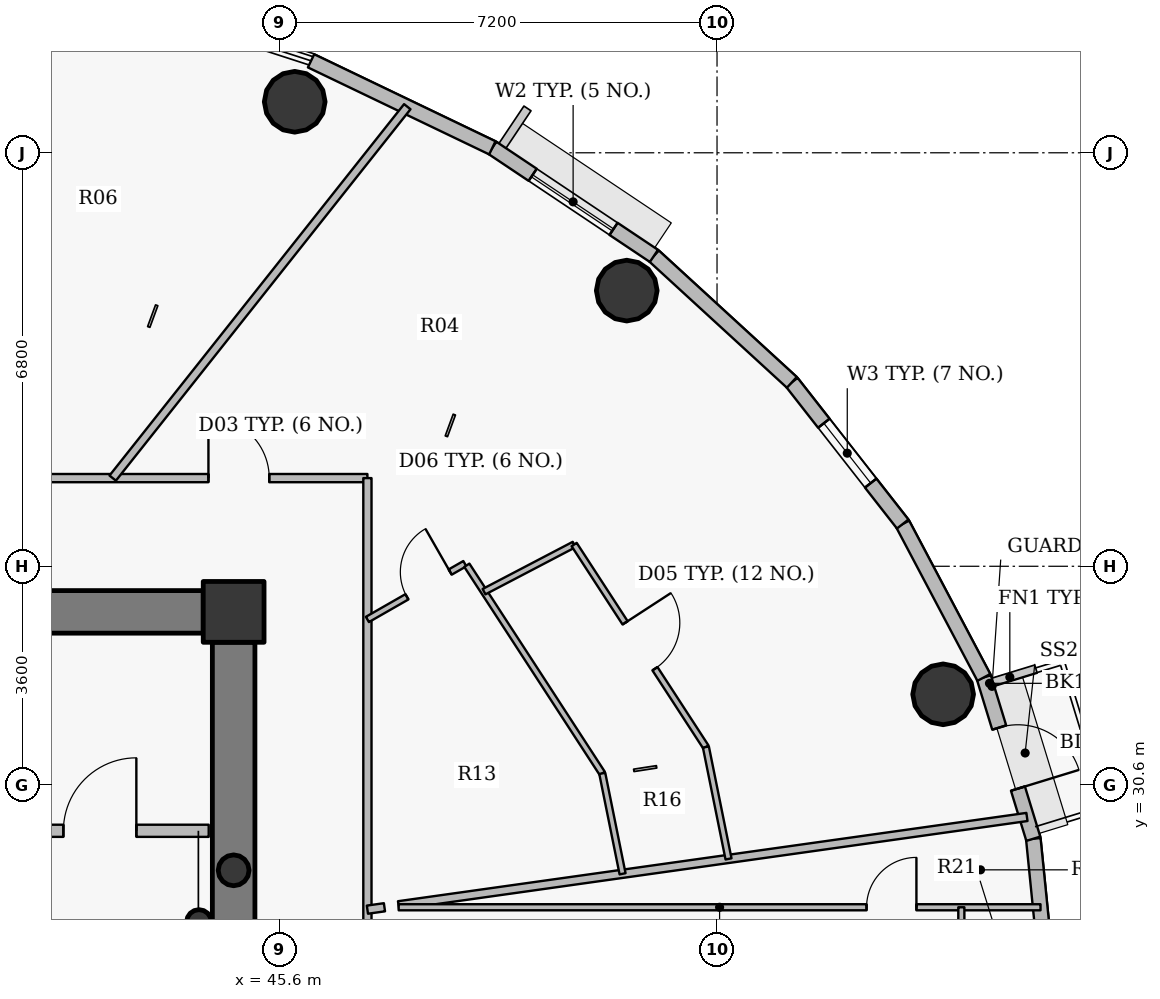
"""IFC4 building model, lengths in metres.
Left out: names, types, materials, properties, quantities, classifications, styles, units other than length and angle.
Written with IfcOpenShell. Run it as: python <this file> out.ifc"""

import sys

from ifc_helpers import new_model, si_unit, direction, frame, frame_2d, origin, origin_2d, place, context, subcontext, project, spatial, rectangle, hollow_circle, extrude, source, transform, mapped, element, fill, save


model = new_model("IFC4")
c1 = context("Model", 3, precision=1e-05, world=origin(), true_north=direction((0.0, 1.0)))
c2 = subcontext(c1, "Body", "Model", "MODEL_VIEW")
j1 = project(units=[si_unit("LENGTHUNIT", "METRE"), si_unit("PLANEANGLEUNIT", "RADIAN")], contexts=[c1])
p1 = place(None, origin())
s1 = spatial("IfcSite", under=j1, at=p1, CompositionType="ELEMENT")
p2 = place(p1, origin())
s2 = spatial("IfcBuilding", under=s1, at=p2, CompositionType="ELEMENT")
p3 = place(p2, frame((0.0, 0.0, 273.0)))
s3 = spatial("IfcBuildingStorey", under=s2, at=p3, CompositionType="ELEMENT", Elevation=273.0)
p4 = place(p3, frame((44.85, 33.45, 0.0), z_axis=(0.0, 0.0, 1.0), x_axis=(1.0, 0.0, 0.0)))
e1 = element("IfcColumn", 1, at=p4, inside=s3, PredefinedType="COLUMN", context=c2, shape_type="SweptSolid", body=[
    extrude(rectangle(XDim=1.0, YDim=1.0, at=origin_2d()), origin(), (0.0, 0.0, 1.0), 3.75),
])
p5 = place(p3, frame((44.28, 28.35, 0.0), z_axis=(0.0, 0.0, 1.0), x_axis=(1.0, 0.0, 0.0)))
e2 = element("IfcColumn", 2, at=p5, inside=s3, PredefinedType="COLUMN", context=c2, shape_type="SweptSolid", body=[
    extrude(hollow_circle(Radius=0.203, WallThickness=0.016, at=origin_2d()), origin(), (0.0, 0.0, 1.0), 3.75),
])
p6 = place(p3, frame((27.65, 33.45, 0.0), z_axis=(0.0, 0.0, 1.0), x_axis=(1.0, 0.0, 0.0)))
e3 = element("IfcWall", 3, at=p6, inside=s3, PredefinedType="SHEAR", context=c2, shape_type="SweptSolid", body=[
    extrude(rectangle(XDim=16.7, YDim=0.7, at=frame_2d((8.35, 0.0))), origin(), (0.0, 0.0, 1.0), 3.05),
])
p7 = place(p6, frame((12.775, 0.0, 0.0)))
e4 = element("IfcOpeningElement", 4, at=p7, cuts=e3, PredefinedType="OPENING", context=c2, shape_type="SweptSolid", body=[
    extrude(rectangle(XDim=1.15, YDim=2.15, at=origin_2d()), frame((0.575, 0.36, 1.075), z_axis=(0.0, -1.0, 0.0), x_axis=(1.0, 0.0, 0.0)), (0.0, 0.0, 1.0), 0.72),
])
p8 = place(p3, frame((44.85, 32.95, 0.0), z_axis=(0.0, 0.0, 1.0), x_axis=(0.0, -1.0, 0.0)))
e5 = element("IfcWall", 5, at=p8, inside=s3, PredefinedType="SHEAR", context=c2, shape_type="SweptSolid", body=[
    extrude(rectangle(XDim=11.9, YDim=0.7, at=frame_2d((5.95, 0.0))), origin(), (0.0, 0.0, 1.0), 3.05),
])
for number, where, z_axis, x_axis in (
    (6, (56.519, 32.094, 0.0), (0.0, 0.0, 1.0), (1.0, 0.0, 0.0)),
    (7, (51.315, 38.733, 0.0), (0.0, 0.0, 1.0), (1.0, 0.0, 0.0)),
    (8, (45.854, 41.839, 0.0), (0.0, 0.0, 1.0), (1.0, 0.0, 0.0)),
):
    element("IfcColumn", number, at=place(p3, frame(where, z_axis=z_axis, x_axis=x_axis)), inside=s3, PredefinedType="COLUMN", context=c2, shape_type="SweptSolid", body=[
        extrude(hollow_circle(Radius=0.5, WallThickness=0.032, at=origin_2d()), origin(), (0.0, 0.0, 1.0), 3.75),
    ])
p9 = place(p3, frame((44.85, 29.2, 0.0), z_axis=(0.0, 0.0, 1.0), x_axis=(1.0, 0.0, 0.0)))
e9 = element("IfcColumn", 9, at=p9, inside=s3, PredefinedType="COLUMN", context=c2, shape_type="SweptSolid", body=[
    extrude(hollow_circle(Radius=0.254, WallThickness=0.02, at=origin_2d()), origin(), (0.0, 0.0, 1.0), 3.75),
])
p10 = place(p3, frame((58.002, 29.719, 0.0), z_axis=(0.0, 0.0, 1.0), x_axis=(0.099972526841, -0.99499019788, 0.0)))
e10 = element("IfcWall", 10, at=p10, inside=s3, PredefinedType="SOLIDWALL", context=c2, shape_type="SweptSolid", body=[
    extrude(rectangle(XDim=2.733, YDim=0.24, at=frame_2d((1.366, 0.0))), origin(), (0.0, 0.0, 1.0), 3.5),
])
p11 = place(p3, frame((57.188, 32.372, 0.0), z_axis=(0.0, 0.0, 1.0), x_axis=(0.2931213403, -0.956075248012, 0.0)))
e11 = element("IfcWall", 11, at=p11, inside=s3, PredefinedType="SOLIDWALL", context=c2, shape_type="SweptSolid", body=[
    extrude(rectangle(XDim=2.775, YDim=0.24, at=frame_2d((1.388, 0.0))), origin(), (0.0, 0.0, 1.0), 3.5),
])
p12 = place(p11, frame((0.863, 0.0, 0.0)))
e12 = element("IfcOpeningElement", 12, at=p12, cuts=e11, PredefinedType="OPENING", context=c2, shape_type="SweptSolid", body=[
    extrude(rectangle(XDim=1.05, YDim=2.15, at=origin_2d()), frame((0.525, 0.13, 1.075), z_axis=(0.0, -1.0, 0.0), x_axis=(1.0, 0.0, 0.0)), (0.0, 0.0, 1.0), 0.26),
])
p13 = place(p3, frame((55.854, 34.895, 0.0), z_axis=(0.0, 0.0, 1.0), x_axis=(0.467628269026, -0.883925224218, 0.0)))
e13 = element("IfcWall", 13, at=p13, inside=s3, PredefinedType="SOLIDWALL", context=c2, shape_type="SweptSolid", body=[
    extrude(rectangle(XDim=2.854, YDim=0.24, at=frame_2d((1.427, 0.0))), origin(), (0.0, 0.0, 1.0), 3.5),
])
p14 = place(p3, frame((54.03, 37.225, 0.0), z_axis=(0.0, 0.0, 1.0), x_axis=(0.616337186556, -0.787482363275, 0.0)))
e14 = element("IfcWall", 14, at=p14, inside=s3, PredefinedType="SOLIDWALL", context=c2, shape_type="SweptSolid", body=[
    extrude(rectangle(XDim=2.958, YDim=0.24, at=frame_2d((1.479, 0.0))), origin(), (0.0, 0.0, 1.0), 3.5),
])
p15 = place(p14, frame((0.854, 0.0, 0.9)))
e15 = element("IfcOpeningElement", 15, at=p15, cuts=e14, PredefinedType="OPENING", context=c2, shape_type="SweptSolid", body=[
    extrude(rectangle(XDim=1.25, YDim=1.65, at=origin_2d()), frame((0.625, 0.13, 0.825), z_axis=(0.0, -1.0, 0.0), x_axis=(1.0, 0.0, 0.0)), (0.0, 0.0, 1.0), 0.26),
])
p16 = place(p3, frame((51.762, 39.304, 0.0), z_axis=(0.0, 0.0, 1.0), x_axis=(0.737068506972, -0.675818034703, 0.0)))
e16 = element("IfcWall", 16, at=p16, inside=s3, PredefinedType="SOLIDWALL", context=c2, shape_type="SweptSolid", body=[
    extrude(rectangle(XDim=3.077, YDim=0.24, at=frame_2d((1.539, 0.0))), origin(), (0.0, 0.0, 1.0), 3.5),
])
p17 = place(p3, frame((49.104, 41.082, 0.0), z_axis=(0.0, 0.0, 1.0), x_axis=(0.831250592635, -0.55589787933, 0.0)))
e17 = element("IfcWall", 17, at=p17, inside=s3, PredefinedType="SOLIDWALL", context=c2, shape_type="SweptSolid", body=[
    extrude(rectangle(XDim=3.197, YDim=0.24, at=frame_2d((1.599, 0.0))), origin(), (0.0, 0.0, 1.0), 3.5),
])
p18 = place(p17, frame((0.798, 0.0, 0.9)))
e18 = element("IfcOpeningElement", 18, at=p18, cuts=e17, PredefinedType="OPENING", context=c2, shape_type="SweptSolid", body=[
    extrude(rectangle(XDim=1.6, YDim=1.75, at=origin_2d()), frame((0.8, 0.13, 0.875), z_axis=(0.0, -1.0, 0.0), x_axis=(1.0, 0.0, 0.0)), (0.0, 0.0, 1.0), 0.26),
])
p19 = place(p3, frame((46.123, 42.512, 0.0), z_axis=(0.0, 0.0, 1.0), x_axis=(0.901573741254, -0.43262546051, 0.0)))
e19 = element("IfcWall", 19, at=p19, inside=s3, PredefinedType="SOLIDWALL", context=c2, shape_type="SweptSolid", body=[
    extrude(rectangle(XDim=3.307, YDim=0.24, at=frame_2d((1.653, 0.0))), origin(), (0.0, 0.0, 1.0), 3.5),
])
p20 = place(p3, frame((35.95, 29.85, 0.0), z_axis=(0.0, 0.0, 1.0), x_axis=(1.0, 0.0, 0.0)))
e20 = element("IfcWall", 20, at=p20, inside=s3, PredefinedType="PARTITIONING", context=c2, shape_type="SweptSolid", body=[
    extrude(rectangle(XDim=8.49, YDim=0.2, at=frame_2d((4.245, 0.0))), origin(), (0.0, 0.0, 1.0), 3.085),
])
p21 = place(p20, frame((6.1, 0.0, 0.0)))
e21 = element("IfcOpeningElement", 21, at=p21, cuts=e20, PredefinedType="OPENING", context=c2, shape_type="SweptSolid", body=[
    extrude(rectangle(XDim=1.2, YDim=2.15, at=origin_2d()), frame((0.6, 0.11, 1.075), z_axis=(0.0, -1.0, 0.0), x_axis=(1.0, 0.0, 0.0)), (0.0, 0.0, 1.0), 0.22),
])
p22 = place(p20, frame((0.37, 0.0, 0.0)))
e22 = element("IfcOpeningElement", 22, at=p22, cuts=e20, PredefinedType="OPENING", context=c2, shape_type="SweptSolid", body=[
    extrude(rectangle(XDim=1.15, YDim=2.15, at=origin_2d()), frame((0.575, 0.11, 1.075), z_axis=(0.0, -1.0, 0.0), x_axis=(1.0, 0.0, 0.0)), (0.0, 0.0, 1.0), 0.22),
])
p23 = place(p20, frame((2.425, 0.0, 0.0)))
e23 = element("IfcOpeningElement", 23, at=p23, cuts=e20, PredefinedType="OPENING", context=c2, shape_type="SweptSolid", body=[
    extrude(rectangle(XDim=1.05, YDim=2.15, at=origin_2d()), frame((0.525, 0.11, 1.075), z_axis=(0.0, -1.0, 0.0), x_axis=(1.0, 0.0, 0.0)), (0.0, 0.0, 1.0), 0.22),
])
p24 = place(p3, frame((36.95, 35.65, 0.0), z_axis=(0.0, 0.0, 1.0), x_axis=(1.0, 0.0, 0.0)))
e24 = element("IfcWall", 24, at=p24, inside=s3, PredefinedType="PARTITIONING", context=c2, shape_type="SweptSolid", body=[
    extrude(rectangle(XDim=10.1, YDim=0.135, at=frame_2d((5.05, 0.0))), origin(), (0.0, 0.0, 1.0), 3.035),
])
p25 = place(p24, frame((7.486, 0.0, 0.0)))
e25 = element("IfcOpeningElement", 25, at=p25, cuts=e24, PredefinedType="OPENING", context=c2, shape_type="SweptSolid", body=[
    extrude(rectangle(XDim=1.0, YDim=2.15, at=origin_2d()), frame((0.5, 0.078, 1.075), z_axis=(0.0, -1.0, 0.0), x_axis=(1.0, 0.0, 0.0)), (0.0, 0.0, 1.0), 0.155),
])
p26 = place(p24, frame((3.272, 0.0, 0.0)))
e26 = element("IfcOpeningElement", 26, at=p26, cuts=e24, PredefinedType="OPENING", context=c2, shape_type="SweptSolid", body=[
    extrude(rectangle(XDim=1.0, YDim=2.15, at=origin_2d()), frame((0.5, 0.078, 1.075), z_axis=(0.0, -1.0, 0.0), x_axis=(1.0, 0.0, 0.0)), (0.0, 0.0, 1.0), 0.155),
])
p27 = place(p3, frame((42.861, 35.65, 0.0), z_axis=(0.0, 0.0, 1.0), x_axis=(0.621439784824, 0.783461928774, 0.0)))
e27 = element("IfcWall", 27, at=p27, inside=s3, PredefinedType="PARTITIONING", context=c2, shape_type="SweptSolid", body=[
    extrude(rectangle(XDim=7.796, YDim=0.135, at=frame_2d((3.898, 0.0))), origin(), (0.0, 0.0, 1.0), 2.985),
])
p28 = place(p3, frame((47.05, 18.503, 0.0), z_axis=(0.0, 0.0, 1.0), x_axis=(0.0, 1.0, 0.0)))
e28 = element("IfcWall", 28, at=p28, inside=s3, PredefinedType="PARTITIONING", context=c2, shape_type="SweptSolid", body=[
    extrude(rectangle(XDim=17.147, YDim=0.135, at=frame_2d((8.574, 0.0))), origin(), (0.0, 0.0, 1.0), 3.035),
])
p29 = place(p28, frame((4.545, 0.0, 0.0)))
e29 = element("IfcOpeningElement", 29, at=p29, cuts=e28, PredefinedType="OPENING", context=c2, shape_type="SweptSolid", body=[
    extrude(rectangle(XDim=1.0, YDim=2.15, at=origin_2d()), frame((0.5, 0.078, 1.075), z_axis=(0.0, -1.0, 0.0), x_axis=(1.0, 0.0, 0.0)), (0.0, 0.0, 1.0), 0.155),
])
p30 = place(p3, frame((47.05, 28.553, 0.0), z_axis=(0.0, 0.0, 1.0), x_axis=(0.990308552968, 0.138884736087, 0.0)))
e30 = element("IfcWall", 30, at=p30, inside=s3, PredefinedType="PARTITIONING", context=c2, shape_type="SweptSolid", body=[
    extrude(rectangle(XDim=0.283, YDim=0.135, at=frame_2d((0.142, 0.0))), origin(), (0.0, 0.0, 1.0), 3.5),
])
p31 = place(p3, frame((47.05, 33.326, 0.0), z_axis=(0.0, 0.0, 1.0), x_axis=(0.867827775188, 0.496865125172, 0.0)))
e31 = element("IfcWall", 31, at=p31, inside=s3, PredefinedType="PARTITIONING", context=c2, shape_type="SweptSolid", body=[
    extrude(rectangle(XDim=1.846, YDim=0.1, at=frame_2d((0.923, 0.0))), origin(), (0.0, 0.0, 1.0), 3.5),
])
p32 = place(p31, frame((0.749, 0.0, 0.0)))
e32 = element("IfcOpeningElement", 32, at=p32, cuts=e31, PredefinedType="OPENING", context=c2, shape_type="SweptSolid", body=[
    extrude(rectangle(XDim=0.82, YDim=2.1, at=origin_2d()), frame((0.41, 0.06, 1.05), z_axis=(0.0, -1.0, 0.0), x_axis=(1.0, 0.0, 0.0)), (0.0, 0.0, 1.0), 0.12),
])
p33 = place(p3, frame((47.562, 28.625, 0.0), z_axis=(0.0, 0.0, 1.0), x_axis=(0.990269276455, 0.139164507362, 0.0)))
e33 = element("IfcWall", 33, at=p33, inside=s3, PredefinedType="PARTITIONING", context=c2, shape_type="SweptSolid", body=[
    extrude(rectangle(XDim=10.437, YDim=0.135, at=frame_2d((5.218, 0.0))), origin(), (0.0, 0.0, 1.0), 2.985),
])
p34 = place(p3, frame((47.564, 28.592, 0.0), z_axis=(0.0, 0.0, 1.0), x_axis=(1.0, 0.0, 0.0)))
e34 = element("IfcWall", 34, at=p34, inside=s3, PredefinedType="PARTITIONING", context=c2, shape_type="SweptSolid", body=[
    extrude(rectangle(XDim=10.555, YDim=0.1, at=frame_2d((5.278, 0.0))), origin(), (0.0, 0.0, 1.0), 2.985),
])
p35 = place(p34, frame((7.695, 0.0, 0.0)))
e35 = element("IfcOpeningElement", 35, at=p35, cuts=e34, PredefinedType="OPENING", context=c2, shape_type="SweptSolid", body=[
    extrude(rectangle(XDim=0.82, YDim=2.1, at=origin_2d()), frame((0.41, 0.06, 1.05), z_axis=(0.0, -1.0, 0.0), x_axis=(1.0, 0.0, 0.0)), (0.0, 0.0, 1.0), 0.12),
])
p36 = place(p3, frame((48.685, 34.217, 0.0), z_axis=(0.0, 0.0, 1.0), x_axis=(0.54540855562, -0.8381703332, 0.0)))
e36 = element("IfcWall", 36, at=p36, inside=s3, PredefinedType="PARTITIONING", context=c2, shape_type="SweptSolid", body=[
    extrude(rectangle(XDim=4.084, YDim=0.1, at=frame_2d((2.042, 0.0))), origin(), (0.0, 0.0, 1.0), 3.035),
])
p37 = place(p3, frame((48.968, 33.782, 0.0), z_axis=(0.0, 0.0, 1.0), x_axis=(0.886102824681, 0.463488709779, 0.0)))
e37 = element("IfcWall", 37, at=p37, inside=s3, PredefinedType="PARTITIONING", context=c2, shape_type="SweptSolid", body=[
    extrude(rectangle(XDim=1.672, YDim=0.1, at=frame_2d((0.836, 0.0))), origin(), (0.0, 0.0, 1.0), 3.5),
])
p38 = place(p3, frame((50.45, 34.558, 0.0), z_axis=(0.0, 0.0, 1.0), x_axis=(0.545448348881, -0.838144437853, 0.0)))
e38 = element("IfcWall", 38, at=p38, inside=s3, PredefinedType="PARTITIONING", context=c2, shape_type="SweptSolid", body=[
    extrude(rectangle(XDim=3.973, YDim=0.1, at=frame_2d((1.986, 0.0))), origin(), (0.0, 0.0, 1.0), 3.035),
])
p39 = place(p38, frame((1.536, 0.0, 0.0)))
e39 = element("IfcOpeningElement", 39, at=p39, cuts=e38, PredefinedType="OPENING", context=c2, shape_type="SweptSolid", body=[
    extrude(rectangle(XDim=0.9, YDim=2.1, at=origin_2d()), frame((0.45, 0.06, 1.05), z_axis=(0.0, -1.0, 0.0), x_axis=(1.0, 0.0, 0.0)), (0.0, 0.0, 1.0), 0.12),
])
p40 = place(p3, frame((50.913, 30.794, 0.0), z_axis=(0.0, 0.0, 1.0), x_axis=(0.198233557602, -0.980154812588, 0.0)))
e40 = element("IfcWall", 40, at=p40, inside=s3, PredefinedType="PARTITIONING", context=c2, shape_type="SweptSolid", body=[
    extrude(rectangle(XDim=1.685, YDim=0.1, at=frame_2d((0.842, 0.0))), origin(), (0.0, 0.0, 1.0), 3.035),
])
p41 = place(p3, frame((52.617, 31.228, 0.0), z_axis=(0.0, 0.0, 1.0), x_axis=(0.198191443997, -0.980163329005, 0.0)))
e41 = element("IfcWall", 41, at=p41, inside=s3, PredefinedType="PARTITIONING", context=c2, shape_type="SweptSolid", body=[
    extrude(rectangle(XDim=1.877, YDim=0.1, at=frame_2d((0.939, 0.0))), origin(), (0.0, 0.0, 1.0), 3.035),
])
p42 = place(p3, frame((56.818, 20.917, 0.0), z_axis=(0.0, 0.0, 1.0), x_axis=(0.0, 1.0, 0.0)))
e42 = element("IfcWall", 42, at=p42, inside=s3, PredefinedType="PARTITIONING", context=c2, shape_type="SweptSolid", body=[
    extrude(rectangle(XDim=7.675, YDim=0.1, at=frame_2d((3.837, 0.0))), origin(), (0.0, 0.0, 1.0), 2.985),
])
p43 = place(p42, frame((3.388, 0.0, 0.0)))
e43 = element("IfcOpeningElement", 43, at=p43, cuts=e42, PredefinedType="OPENING", context=c2, shape_type="SweptSolid", body=[
    extrude(rectangle(XDim=0.9, YDim=2.1, at=origin_2d()), frame((0.45, 0.06, 1.05), z_axis=(0.0, -1.0, 0.0), x_axis=(1.0, 0.0, 0.0)), (0.0, 0.0, 1.0), 0.12),
])
p44 = place(p3, frame((45.2, 33.8, 0.0), z_axis=(0.0, 0.0, 1.0), x_axis=(-1.0, 0.0, 0.0)))
e44 = element("IfcWall", 44, at=p44, inside=s3, PredefinedType="PARTITIONING", context=c2, shape_type="SweptSolid", body=[
    extrude(rectangle(XDim=0.84, YDim=0.135, at=frame_2d((0.42, 0.0))), origin(), (0.0, 0.0, 1.0), 3.035),
])
p45 = place(p3, frame((45.2, 32.96, 0.0), z_axis=(0.0, 0.0, 1.0), x_axis=(0.0, 1.0, 0.0)))
e45 = element("IfcWall", 45, at=p45, inside=s3, PredefinedType="PARTITIONING", context=c2, shape_type="SweptSolid", body=[
    extrude(rectangle(XDim=0.532, YDim=0.135, at=frame_2d((0.266, 0.0))), origin(), (0.0, 0.0, 1.0), 3.185),
])
m1 = source(origin(), c2, "Body", "SweptSolid", [
    extrude(rectangle(XDim=1.05, YDim=2.15, at=origin_2d()), frame((0.525, 0.025, 1.075), z_axis=(0.0, -1.0, 0.0), x_axis=(1.0, 0.0, 0.0)), (0.0, 0.0, 1.0), 0.05),
])
p46 = place(p12, origin())
e46 = element("IfcDoor", 46, at=p46, inside=s3, OperationType="SINGLE_SWING_RIGHT", PredefinedType="DOOR", context=c2, shape_type="MappedRepresentation", body=[
    mapped(m1, transform((0.0, 0.0, 0.0), x_axis=(1.0, 0.0, 0.0), y_axis=(0.0, 1.0, 0.0), z_axis=(0.0, 0.0, 1.0), scale=1.0)),
])
fill(e12, e46)
m2 = source(origin(), c2, "Body", "SweptSolid", [
    extrude(rectangle(XDim=1.25, YDim=1.65, at=origin_2d()), frame((0.625, 0.03, 0.825), z_axis=(0.0, -1.0, 0.0), x_axis=(1.0, 0.0, 0.0)), (0.0, 0.0, 1.0), 0.06),
])
p47 = place(p15, origin())
e47 = element("IfcWindow", 47, at=p47, inside=s3, PartitioningType="SINGLE_PANEL", PredefinedType="WINDOW", context=c2, shape_type="MappedRepresentation", body=[
    mapped(m2, transform((0.0, 0.0, 0.0), x_axis=(1.0, 0.0, 0.0), y_axis=(0.0, 1.0, 0.0), z_axis=(0.0, 0.0, 1.0), scale=1.0)),
])
fill(e15, e47)
m3 = source(origin(), c2, "Body", "SweptSolid", [
    extrude(rectangle(XDim=1.6, YDim=1.75, at=origin_2d()), frame((0.8, 0.03, 0.875), z_axis=(0.0, -1.0, 0.0), x_axis=(1.0, 0.0, 0.0)), (0.0, 0.0, 1.0), 0.06),
])
p48 = place(p18, origin())
e48 = element("IfcWindow", 48, at=p48, inside=s3, PartitioningType="DOUBLE_PANEL_VERTICAL", PredefinedType="WINDOW", context=c2, shape_type="MappedRepresentation", body=[
    mapped(m3, transform((0.0, 0.0, 0.0), x_axis=(1.0, 0.0, 0.0), y_axis=(0.0, 1.0, 0.0), z_axis=(0.0, 0.0, 1.0), scale=1.0)),
])
fill(e18, e48)
m4 = source(origin(), c2, "Body", "SweptSolid", [
    extrude(rectangle(XDim=1.2, YDim=2.15, at=origin_2d()), frame((0.6, 0.025, 1.075), z_axis=(0.0, -1.0, 0.0), x_axis=(1.0, 0.0, 0.0)), (0.0, 0.0, 1.0), 0.05),
])
p49 = place(p21, origin())
e49 = element("IfcDoor", 49, at=p49, inside=s3, OperationType="SINGLE_SWING_RIGHT", PredefinedType="DOOR", context=c2, shape_type="MappedRepresentation", body=[
    mapped(m4, transform((0.0, 0.0, 0.0), x_axis=(1.0, 0.0, 0.0), y_axis=(0.0, 1.0, 0.0), z_axis=(0.0, 0.0, 1.0), scale=1.0)),
])
fill(e21, e49)
m5 = source(origin(), c2, "Body", "SweptSolid", [
    extrude(rectangle(XDim=1.0, YDim=2.15, at=origin_2d()), frame((0.5, 0.025, 1.075), z_axis=(0.0, -1.0, 0.0), x_axis=(1.0, 0.0, 0.0)), (0.0, 0.0, 1.0), 0.05),
])
p50 = place(p25, origin())
e50 = element("IfcDoor", 50, at=p50, inside=s3, OperationType="SINGLE_SWING_LEFT", PredefinedType="DOOR", context=c2, shape_type="MappedRepresentation", body=[
    mapped(m5, transform((0.0, 0.0, 0.0), x_axis=(1.0, 0.0, 0.0), y_axis=(0.0, 1.0, 0.0), z_axis=(0.0, 0.0, 1.0), scale=1.0)),
])
fill(e25, e50)
m6 = source(origin(), c2, "Body", "SweptSolid", [
    extrude(rectangle(XDim=0.82, YDim=2.1, at=origin_2d()), frame((0.41, 0.025, 1.05), z_axis=(0.0, -1.0, 0.0), x_axis=(1.0, 0.0, 0.0)), (0.0, 0.0, 1.0), 0.05),
])
p51 = place(p32, origin())
e51 = element("IfcDoor", 51, at=p51, inside=s3, OperationType="SINGLE_SWING_RIGHT", PredefinedType="DOOR", context=c2, shape_type="MappedRepresentation", body=[
    mapped(m6, transform((0.0, 0.0, 0.0), x_axis=(1.0, 0.0, 0.0), y_axis=(0.0, 1.0, 0.0), z_axis=(0.0, 0.0, 1.0), scale=1.0)),
])
fill(e32, e51)
m7 = source(origin(), c2, "Body", "SweptSolid", [
    extrude(rectangle(XDim=0.9, YDim=2.1, at=origin_2d()), frame((0.45, 0.025, 1.05), z_axis=(0.0, -1.0, 0.0), x_axis=(1.0, 0.0, 0.0)), (0.0, 0.0, 1.0), 0.05),
])
p52 = place(p39, origin())
e52 = element("IfcDoor", 52, at=p52, inside=s3, OperationType="SINGLE_SWING_LEFT", PredefinedType="DOOR", context=c2, shape_type="MappedRepresentation", body=[
    mapped(m7, transform((0.0, 0.0, 0.0), x_axis=(1.0, 0.0, 0.0), y_axis=(0.0, 1.0, 0.0), z_axis=(0.0, 0.0, 1.0), scale=1.0)),
])
fill(e39, e52)
p53 = place(p35, origin())
e53 = element("IfcDoor", 53, at=p53, inside=s3, OperationType="SINGLE_SWING_RIGHT", PredefinedType="DOOR", context=c2, shape_type="MappedRepresentation", body=[
    mapped(m6, transform((0.0, 0.0, 0.0), x_axis=(1.0, 0.0, 0.0), y_axis=(0.0, 1.0, 0.0), z_axis=(0.0, 0.0, 1.0), scale=1.0)),
])
fill(e35, e53)
save(model, sys.argv[1])
